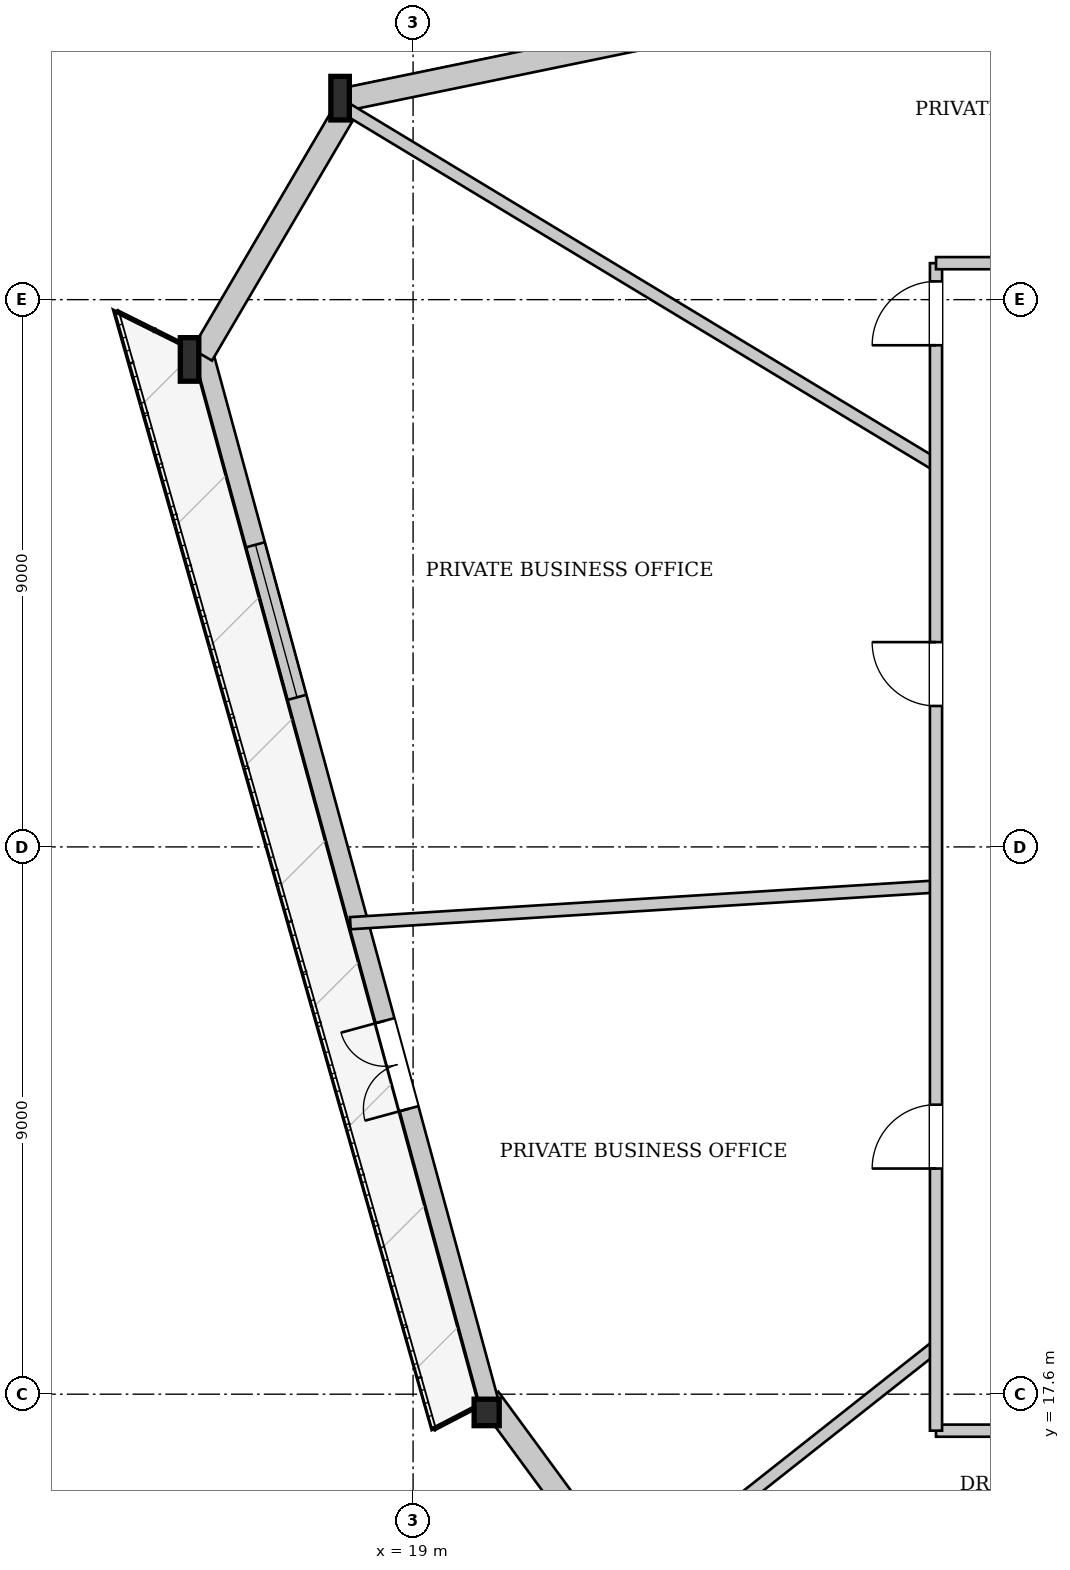
"""IFC4 building model, lengths in metres.
Left out: names, types, materials, properties, quantities, classifications, styles, units other than length and angle.
Written with IfcOpenShell. Run it as: python <this file> out.ifc"""

import sys

from ifc_helpers import new_model, si_unit, direction, frame, frame_2d, origin, origin_2d, place, context, subcontext, project, spatial, rectangle, i_section, extrude, source, transform, mapped, element, fill, save


model = new_model("IFC4")
c1 = context("Model", 3, precision=1e-05, world=origin(), true_north=direction((0.0, 1.0)))
c2 = subcontext(c1, "Body", "Model", "MODEL_VIEW")
j1 = project(units=[si_unit("LENGTHUNIT", "METRE"), si_unit("PLANEANGLEUNIT", "RADIAN")], contexts=[c1])
p1 = place(None, origin())
s1 = spatial("IfcSite", under=j1, at=p1, CompositionType="ELEMENT")
p2 = place(p1, origin())
s2 = spatial("IfcBuilding", under=s1, at=p2, CompositionType="ELEMENT")
p3 = place(p2, frame((0.0, 0.0, 146.6)))
s3 = spatial("IfcBuildingStorey", under=s2, at=p3, CompositionType="ELEMENT", Elevation=146.6)
m1 = source(origin(), c2, "Body", "SweptSolid", [
    extrude(i_section(OverallWidth=0.304, OverallDepth=0.716, WebThickness=0.021, FlangeThickness=0.04, at=origin_2d()), origin(), (0.0, 0.0, 1.0), 3.408),
])
p4 = place(p3, frame((17.888, 39.09, 0.0), z_axis=(-0.0518677655, -0.103305687639, 0.993296365544), x_axis=(0.893682251955, -0.448700381703, 0.0)))
e1 = element("IfcColumn", 1, at=p4, inside=s3, PredefinedType="COLUMN", context=c2, shape_type="MappedRepresentation", body=[
    mapped(m1, transform((0.0, 0.0, 0.0), x_axis=(1.0, 0.0, 0.0), y_axis=(0.0, 1.0, 0.0), z_axis=(0.0, 0.0, 1.0), scale=1.0)),
])
m2 = source(origin(), c2, "Body", "SweptSolid", [
    extrude(i_section(OverallWidth=0.304, OverallDepth=0.716, WebThickness=0.021, FlangeThickness=0.04, at=origin_2d()), origin(), (0.0, 0.0, 1.0), 3.404),
])
p5 = place(p3, frame((15.365, 34.789, 0.0), z_axis=(-0.024245185019, -0.101356350391, 0.994554705001), x_axis=(0.972561966295, -0.232643980614, 0.0)))
e2 = element("IfcColumn", 2, at=p5, inside=s3, PredefinedType="COLUMN", context=c2, shape_type="MappedRepresentation", body=[
    mapped(m2, transform((0.0, 0.0, 0.0), x_axis=(1.0, 0.0, 0.0), y_axis=(0.0, 1.0, 0.0), z_axis=(0.0, 0.0, 1.0), scale=1.0)),
])
m3 = source(origin(), c2, "Body", "SweptSolid", [
    extrude(i_section(OverallWidth=0.412, OverallDepth=0.435, WebThickness=0.031, FlangeThickness=0.05, at=origin_2d()), origin(), (0.0, 0.0, 1.0), 3.401),
])
p6 = place(p3, frame((20.095, 17.418, 0.0), z_axis=(0.067691864863, -0.069558236534, 0.995278585704), x_axis=(0.716655992996, 0.697426833225, 0.0)))
e3 = element("IfcColumn", 3, at=p6, inside=s3, PredefinedType="COLUMN", context=c2, shape_type="MappedRepresentation", body=[
    mapped(m3, transform((0.0, 0.0, 0.0), x_axis=(1.0, 0.0, 0.0), y_axis=(0.0, 1.0, 0.0), z_axis=(0.0, 0.0, 1.0), scale=1.0)),
])
p7 = place(p3, frame((30.899, 3.016, 0.0), z_axis=(0.0, 0.0, 1.0), x_axis=(-0.591609379136, 0.806224746903, 0.0)))
e4 = element("IfcWall", 4, at=p7, inside=s3, PredefinedType="SOLIDWALL", context=c2, shape_type="SweptSolid", body=[
    extrude(rectangle(XDim=18.003, YDim=0.38, at=frame_2d((9.001, 0.0))), origin(), (0.0, 0.0, 1.0), 2.692),
])
p8 = place(p7, frame((3.941, 0.0, 0.322)))
e5 = element("IfcOpeningElement", 5, at=p8, cuts=e4, PredefinedType="OPENING", context=c2, shape_type="SweptSolid", body=[
    extrude(rectangle(XDim=2.2, YDim=2.25, at=frame_2d((1.1, 1.125))), frame((0.0, 0.2, 0.0), z_axis=(0.0, -1.0, 0.0), x_axis=(1.0, 0.0, 0.0)), (0.0, 0.0, 1.0), 0.4),
])
p9 = place(p7, frame((10.762, 0.0, 0.322)))
e6 = element("IfcOpeningElement", 6, at=p9, cuts=e4, PredefinedType="OPENING", context=c2, shape_type="SweptSolid", body=[
    extrude(rectangle(XDim=2.2, YDim=2.25, at=frame_2d((1.1, 1.125))), frame((0.0, 0.2, 0.0), z_axis=(0.0, -1.0, 0.0), x_axis=(1.0, 0.0, 0.0)), (0.0, 0.0, 1.0), 0.4),
])
p10 = place(p3, frame((20.25, 17.46, 0.0), z_axis=(0.0, 0.0, 1.0), x_axis=(-0.262728395916, 0.964869830588, 0.0)))
e7 = element("IfcWall", 7, at=p10, inside=s3, PredefinedType="SOLIDWALL", context=c2, shape_type="SweptSolid", body=[
    extrude(rectangle(XDim=18.003, YDim=0.32, at=frame_2d((9.002, 0.0))), origin(), (0.0, 0.0, 1.0), 2.692),
])
p11 = place(p10, frame((5.011, 0.0, 0.0)))
e8 = element("IfcOpeningElement", 8, at=p11, cuts=e7, PredefinedType="OPENING", context=c2, shape_type="SweptSolid", body=[
    extrude(rectangle(XDim=1.5, YDim=2.3, at=frame_2d((0.75, 1.15))), frame((0.0, 0.17, 0.0), z_axis=(0.0, -1.0, 0.0), x_axis=(1.0, 0.0, 0.0)), (0.0, 0.0, 1.0), 0.34),
])
p12 = place(p10, frame((12.022, 0.0, 0.25)))
e9 = element("IfcOpeningElement", 9, at=p12, cuts=e7, PredefinedType="OPENING", context=c2, shape_type="SweptSolid", body=[
    extrude(rectangle(XDim=2.6, YDim=2.35, at=frame_2d((1.3, 1.175))), frame((0.0, 0.17, 0.0), z_axis=(0.0, -1.0, 0.0), x_axis=(1.0, 0.0, 0.0)), (0.0, 0.0, 1.0), 0.34),
])
p13 = place(p3, frame((15.529, 34.693, 0.0), z_axis=(0.0, 0.0, 1.0), x_axis=(0.505994696014, 0.86253658914, 0.0)))
e10 = element("IfcWall", 10, at=p13, inside=s3, PredefinedType="SOLIDWALL", context=c2, shape_type="SweptSolid", body=[
    extrude(rectangle(XDim=4.986, YDim=0.38, at=frame_2d((2.493, 0.0))), origin(), (0.0, 0.0, 1.0), 2.692),
])
p14 = place(p3, frame((17.926, 38.903, 0.0), z_axis=(0.0, 0.0, 1.0), x_axis=(0.979384542026, 0.202004749552, 0.0)))
e11 = element("IfcWall", 11, at=p14, inside=s3, PredefinedType="SOLIDWALL", context=c2, shape_type="SweptSolid", body=[
    extrude(rectangle(XDim=23.044, YDim=0.38, at=frame_2d((11.522, 0.0))), origin(), (0.0, 0.0, 1.0), 2.692),
])
p15 = place(p14, frame((5.352, 0.0, 0.322)))
e12 = element("IfcOpeningElement", 12, at=p15, cuts=e11, PredefinedType="OPENING", context=c2, shape_type="SweptSolid", body=[
    extrude(rectangle(XDim=2.2, YDim=2.25, at=frame_2d((1.1, 1.125))), frame((0.0, 0.2, 0.0), z_axis=(0.0, -1.0, 0.0), x_axis=(1.0, 0.0, 0.0)), (0.0, 0.0, 1.0), 0.4),
])
p16 = place(p14, frame((15.492, 0.0, 0.322)))
e13 = element("IfcOpeningElement", 13, at=p16, cuts=e11, PredefinedType="OPENING", context=c2, shape_type="SweptSolid", body=[
    extrude(rectangle(XDim=2.2, YDim=2.25, at=frame_2d((1.1, 1.125))), frame((0.0, 0.2, 0.0), z_axis=(0.0, -1.0, 0.0), x_axis=(1.0, 0.0, 0.0)), (0.0, 0.0, 1.0), 0.4),
])
p17 = place(p3, frame((27.6, 32.883, 0.0), z_axis=(0.0, 0.0, 1.0), x_axis=(-0.855940231104, 0.517074772909, 0.0)))
e14 = element("IfcWall", 14, at=p17, inside=s3, PredefinedType="PARTITIONING", context=c2, shape_type="SweptSolid", body=[
    extrude(rectangle(XDim=11.489, YDim=0.2, at=frame_2d((5.744, 0.0))), origin(), (0.0, 0.0, 1.0), 2.895),
])
p18 = place(p3, frame((27.6, 25.949, 0.0), z_axis=(0.0, 0.0, 1.0), x_axis=(-0.998046076706, -0.062482227644, 0.0)))
e15 = element("IfcWall", 15, at=p18, inside=s3, PredefinedType="PARTITIONING", context=c2, shape_type="SweptSolid", body=[
    extrude(rectangle(XDim=9.651, YDim=0.2, at=frame_2d((4.826, 0.0))), origin(), (0.0, 0.0, 1.0), 3.3),
])
p19 = place(p3, frame((27.6, 18.385, 0.0), z_axis=(0.0, 0.0, 1.0), x_axis=(-0.784734967532, -0.619831453487, 0.0)))
e16 = element("IfcWall", 16, at=p19, inside=s3, PredefinedType="PARTITIONING", context=c2, shape_type="SweptSolid", body=[
    extrude(rectangle(XDim=6.597, YDim=0.2, at=frame_2d((3.299, 0.0))), origin(), (0.0, 0.0, 1.0), 3.3),
])
p20 = place(p3, frame((27.6, 17.0, 0.0), z_axis=(0.0, 0.0, 1.0), x_axis=(1.0, 0.0, 0.0)))
e17 = element("IfcWall", 17, at=p20, inside=s3, PredefinedType="PARTITIONING", context=c2, shape_type="SweptSolid", body=[
    extrude(rectangle(XDim=20.8, YDim=0.2, at=frame_2d((10.4, 0.0))), origin(), (0.0, 0.0, 1.0), 3.3),
])
p21 = place(p20, frame((1.56, 0.0, 0.0)))
e18 = element("IfcOpeningElement", 18, at=p21, cuts=e17, PredefinedType="OPENING", context=c2, shape_type="SweptSolid", body=[
    extrude(rectangle(XDim=1.05, YDim=2.2, at=frame_2d((0.525, 1.1))), frame((0.0, 0.11, 0.0), z_axis=(0.0, -1.0, 0.0), x_axis=(1.0, 0.0, 0.0)), (0.0, 0.0, 1.0), 0.22),
])
p22 = place(p20, frame((8.616, 0.0, 0.0)))
e19 = element("IfcOpeningElement", 19, at=p22, cuts=e17, PredefinedType="OPENING", context=c2, shape_type="SweptSolid", body=[
    extrude(rectangle(XDim=1.05, YDim=2.2, at=frame_2d((0.525, 1.1))), frame((0.0, 0.11, 0.0), z_axis=(0.0, -1.0, 0.0), x_axis=(1.0, 0.0, 0.0)), (0.0, 0.0, 1.0), 0.22),
])
p23 = place(p20, frame((18.781, 0.0, 0.0)))
e20 = element("IfcOpeningElement", 20, at=p23, cuts=e17, PredefinedType="OPENING", context=c2, shape_type="SweptSolid", body=[
    extrude(rectangle(XDim=1.05, YDim=2.2, at=frame_2d((0.525, 1.1))), frame((0.0, 0.11, 0.0), z_axis=(0.0, -1.0, 0.0), x_axis=(1.0, 0.0, 0.0)), (0.0, 0.0, 1.0), 0.22),
])
p24 = place(p3, frame((27.6, 17.0, 0.0), z_axis=(0.0, 0.0, 1.0), x_axis=(0.0, 1.0, 0.0)))
e21 = element("IfcWall", 21, at=p24, inside=s3, PredefinedType="PARTITIONING", context=c2, shape_type="SweptSolid", body=[
    extrude(rectangle(XDim=19.2, YDim=0.2, at=frame_2d((9.6, 0.0))), origin(), (0.0, 0.0, 1.0), 3.3),
])
p25 = place(p24, frame((17.85, 0.0, 0.0)))
e22 = element("IfcOpeningElement", 22, at=p25, cuts=e21, PredefinedType="OPENING", context=c2, shape_type="SweptSolid", body=[
    extrude(rectangle(XDim=1.05, YDim=2.2, at=frame_2d((0.525, 1.1))), frame((0.0, 0.11, 0.0), z_axis=(0.0, -1.0, 0.0), x_axis=(1.0, 0.0, 0.0)), (0.0, 0.0, 1.0), 0.22),
])
p26 = place(p24, frame((11.918, 0.0, 0.0)))
e23 = element("IfcOpeningElement", 23, at=p26, cuts=e21, PredefinedType="OPENING", context=c2, shape_type="SweptSolid", body=[
    extrude(rectangle(XDim=1.05, YDim=2.2, at=frame_2d((0.525, 1.1))), frame((0.0, 0.11, 0.0), z_axis=(0.0, -1.0, 0.0), x_axis=(1.0, 0.0, 0.0)), (0.0, 0.0, 1.0), 0.22),
])
p27 = place(p24, frame((4.311, 0.0, 0.0)))
e24 = element("IfcOpeningElement", 24, at=p27, cuts=e21, PredefinedType="OPENING", context=c2, shape_type="SweptSolid", body=[
    extrude(rectangle(XDim=1.05, YDim=2.2, at=frame_2d((0.525, 1.1))), frame((0.0, 0.11, 0.0), z_axis=(0.0, -1.0, 0.0), x_axis=(1.0, 0.0, 0.0)), (0.0, 0.0, 1.0), 0.22),
])
p28 = place(p3, frame((27.6, 36.2, 0.0), z_axis=(0.0, 0.0, 1.0), x_axis=(1.0, 0.0, 0.0)))
e25 = element("IfcWall", 25, at=p28, inside=s3, PredefinedType="PARTITIONING", context=c2, shape_type="SweptSolid", body=[
    extrude(rectangle(XDim=13.4, YDim=0.2, at=frame_2d((6.7, 0.0))), origin(), (0.0, 0.0, 1.0), 3.3),
])
p29 = place(p28, frame((8.266, 0.0, 0.0)))
e26 = element("IfcOpeningElement", 26, at=p29, cuts=e25, PredefinedType="OPENING", context=c2, shape_type="SweptSolid", body=[
    extrude(rectangle(XDim=1.05, YDim=2.2, at=frame_2d((0.525, 1.1))), frame((0.0, 0.11, 0.0), z_axis=(0.0, -1.0, 0.0), x_axis=(1.0, 0.0, 0.0)), (0.0, 0.0, 1.0), 0.22),
])
m4 = source(origin(), c2, "Body", "SweptSolid", [
    extrude(rectangle(XDim=1.5, YDim=2.3, at=frame_2d((0.75, 1.15))), frame((0.0, 0.025, 0.0), z_axis=(0.0, -1.0, 0.0), x_axis=(1.0, 0.0, 0.0)), (0.0, 0.0, 1.0), 0.05),
])
p30 = place(p11, origin())
e27 = element("IfcDoor", 27, at=p30, inside=s3, OperationType="DOUBLE_DOOR_SINGLE_SWING", PredefinedType="DOOR", context=c2, shape_type="MappedRepresentation", body=[
    mapped(m4, transform((0.0, 0.0, 0.0), x_axis=(1.0, 0.0, 0.0), y_axis=(0.0, 1.0, 0.0), z_axis=(0.0, 0.0, 1.0), scale=1.0)),
])
fill(e8, e27)
m5 = source(origin(), c2, "Body", "SweptSolid", [
    extrude(rectangle(XDim=2.6, YDim=2.35, at=frame_2d((1.3, 1.175))), frame((0.0, 0.03, 0.0), z_axis=(0.0, -1.0, 0.0), x_axis=(1.0, 0.0, 0.0)), (0.0, 0.0, 1.0), 0.06),
])
p31 = place(p12, origin())
e28 = element("IfcWindow", 28, at=p31, inside=s3, PartitioningType="SINGLE_PANEL", PredefinedType="WINDOW", context=c2, shape_type="MappedRepresentation", body=[
    mapped(m5, transform((0.0, 0.0, 0.0), x_axis=(1.0, 0.0, 0.0), y_axis=(0.0, 1.0, 0.0), z_axis=(0.0, 0.0, 1.0), scale=1.0)),
])
fill(e9, e28)
m6 = source(origin(), c2, "Body", "SweptSolid", [
    extrude(rectangle(XDim=1.05, YDim=2.2, at=frame_2d((0.525, 1.1))), frame((0.0, 0.025, 0.0), z_axis=(0.0, -1.0, 0.0), x_axis=(1.0, 0.0, 0.0)), (0.0, 0.0, 1.0), 0.05),
])
p32 = place(p25, origin())
e29 = element("IfcDoor", 29, at=p32, inside=s3, OperationType="SINGLE_SWING_LEFT", PredefinedType="DOOR", context=c2, shape_type="MappedRepresentation", body=[
    mapped(m6, transform((0.0, 0.0, 0.0), x_axis=(1.0, 0.0, 0.0), y_axis=(0.0, 1.0, 0.0), z_axis=(0.0, 0.0, 1.0), scale=1.0)),
])
fill(e22, e29)
p33 = place(p26, origin())
e30 = element("IfcDoor", 30, at=p33, inside=s3, OperationType="SINGLE_SWING_RIGHT", PredefinedType="DOOR", context=c2, shape_type="MappedRepresentation", body=[
    mapped(m6, transform((0.0, 0.0, 0.0), x_axis=(1.0, 0.0, 0.0), y_axis=(0.0, 1.0, 0.0), z_axis=(0.0, 0.0, 1.0), scale=1.0)),
])
fill(e23, e30)
p34 = place(p27, origin())
e31 = element("IfcDoor", 31, at=p34, inside=s3, OperationType="SINGLE_SWING_LEFT", PredefinedType="DOOR", context=c2, shape_type="MappedRepresentation", body=[
    mapped(m6, transform((0.0, 0.0, 0.0), x_axis=(1.0, 0.0, 0.0), y_axis=(0.0, 1.0, 0.0), z_axis=(0.0, 0.0, 1.0), scale=1.0)),
])
fill(e24, e31)
save(model, sys.argv[1])
